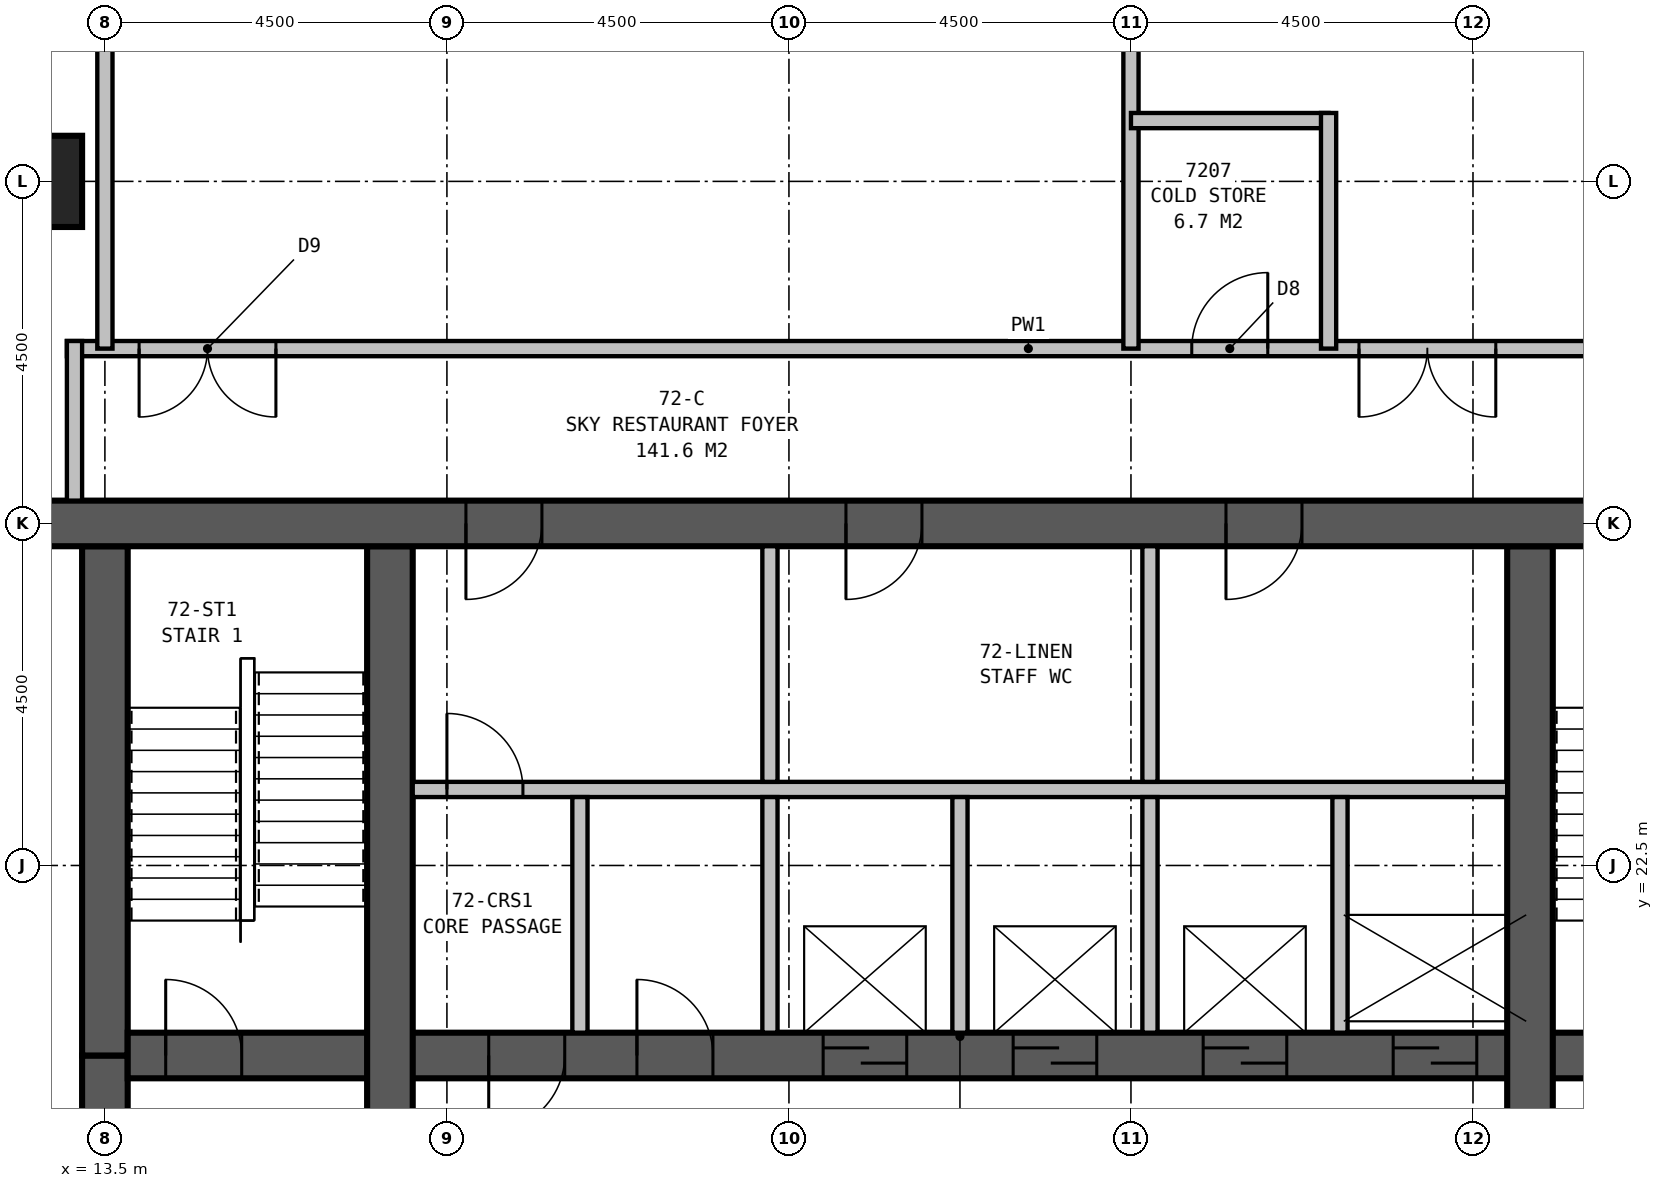
"""IFC4 building model, lengths in metres.
Left out: names, types, materials, properties, quantities, classifications, styles, units other than length and angle.
Written with IfcOpenShell. Run it as: python <this file> out.ifc"""

import sys

from ifc_helpers import new_model, si_unit, direction, frame, frame_2d, origin, origin_2d, place, context, subcontext, project, spatial, rectangle, extrude, element, fill, save


model = new_model("IFC4")
c1 = context("Model", 3, precision=1e-05, world=origin(), true_north=direction((0.0, 1.0)))
c2 = subcontext(c1, "Body", "Model", "MODEL_VIEW")
j1 = project(units=[si_unit("LENGTHUNIT", "METRE"), si_unit("PLANEANGLEUNIT", "RADIAN")], contexts=[c1])
p1 = place(None, origin())
s1 = spatial("IfcSite", under=j1, at=p1, CompositionType="ELEMENT")
p2 = place(p1, origin())
s2 = spatial("IfcBuilding", under=s1, at=p2, CompositionType="ELEMENT")
p3 = place(p2, frame((0.0, 0.0, 281.9)))
s3 = spatial("IfcBuildingStorey", under=s2, at=p3, CompositionType="ELEMENT", Elevation=281.9)
p4 = place(p3, frame((12.5, 31.5, 0.0), z_axis=(0.0, 0.0, 1.0), x_axis=(1.0, 0.0, 0.0)))
e1 = element("IfcColumn", 1, at=p4, inside=s3, PredefinedType="COLUMN", context=c2, shape_type="SweptSolid", body=[
    extrude(rectangle(XDim=1.4, YDim=1.2, at=origin_2d()), origin(), (0.0, 0.0, 1.0), 3.9),
])
p5 = place(p3, frame((36.3, 27.0, 0.0), z_axis=(0.0, 0.0, 1.0), x_axis=(-1.0, 0.0, 0.0)))
e2 = element("IfcWall", 2, at=p5, inside=s3, PredefinedType="SHEAR", context=c2, shape_type="SweptSolid", body=[
    extrude(rectangle(XDim=23.6, YDim=0.6, at=frame_2d((11.8, 0.0))), origin(), (0.0, 0.0, 1.0), 3.9),
])
p6 = place(p5, frame((17.05, 0.0, 0.0)))
e3 = element("IfcOpeningElement", 3, at=p6, cuts=e2, PredefinedType="OPENING", context=c2, shape_type="SweptSolid", body=[
    extrude(rectangle(XDim=1.0, YDim=2.1, at=frame_2d((0.5, 1.05))), frame((0.0, 0.31, 0.0), z_axis=(0.0, -1.0, 0.0), x_axis=(1.0, 0.0, 0.0)), (0.0, 0.0, 1.0), 0.62),
])
p7 = place(p5, frame((12.05, 0.0, 0.0)))
e4 = element("IfcOpeningElement", 4, at=p7, cuts=e2, PredefinedType="OPENING", context=c2, shape_type="SweptSolid", body=[
    extrude(rectangle(XDim=1.0, YDim=2.1, at=frame_2d((0.5, 1.05))), frame((0.0, 0.31, 0.0), z_axis=(0.0, -1.0, 0.0), x_axis=(1.0, 0.0, 0.0)), (0.0, 0.0, 1.0), 0.62),
])
p8 = place(p5, frame((7.05, 0.0, 0.0)))
e5 = element("IfcOpeningElement", 5, at=p8, cuts=e2, PredefinedType="OPENING", context=c2, shape_type="SweptSolid", body=[
    extrude(rectangle(XDim=1.0, YDim=2.1, at=frame_2d((0.5, 1.05))), frame((0.0, 0.31, 0.0), z_axis=(0.0, -1.0, 0.0), x_axis=(1.0, 0.0, 0.0)), (0.0, 0.0, 1.0), 0.62),
])
p9 = place(p3, frame((17.25, 13.8, 0.0), z_axis=(0.0, 0.0, 1.0), x_axis=(0.0, 1.0, 0.0)))
e6 = element("IfcWall", 6, at=p9, inside=s3, PredefinedType="SHEAR", context=c2, shape_type="SweptSolid", body=[
    extrude(rectangle(XDim=12.9, YDim=0.6, at=frame_2d((6.45, 0.0))), origin(), (0.0, 0.0, 1.0), 3.9),
])
p10 = place(p9, frame((3.85, 0.0, 0.0)))
e7 = element("IfcOpeningElement", 7, at=p10, cuts=e6, PredefinedType="OPENING", context=c2, shape_type="SweptSolid", body=[
    extrude(rectangle(XDim=1.2, YDim=2.1, at=frame_2d((0.6, 1.05))), frame((0.0, 0.31, 0.0), z_axis=(0.0, -1.0, 0.0), x_axis=(1.0, 0.0, 0.0)), (0.0, 0.0, 1.0), 0.62),
])
p11 = place(p3, frame((32.25, 13.8, 0.0), z_axis=(0.0, 0.0, 1.0), x_axis=(0.0, 1.0, 0.0)))
e8 = element("IfcWall", 8, at=p11, inside=s3, PredefinedType="SHEAR", context=c2, shape_type="SweptSolid", body=[
    extrude(rectangle(XDim=12.9, YDim=0.6, at=frame_2d((6.45, 0.0))), origin(), (0.0, 0.0, 1.0), 3.9),
])
p12 = place(p11, frame((5.05, 0.0, 0.0), z_axis=(0.0, 0.0, 1.0), x_axis=(-1.0, 0.0, 0.0)))
e9 = element("IfcOpeningElement", 9, at=p12, cuts=e8, PredefinedType="OPENING", context=c2, shape_type="SweptSolid", body=[
    extrude(rectangle(XDim=1.2, YDim=2.1, at=frame_2d((0.6, 1.05))), frame((0.0, 0.31, 0.0), z_axis=(0.0, -1.0, 0.0), x_axis=(1.0, 0.0, 0.0)), (0.0, 0.0, 1.0), 0.62),
])
p13 = place(p3, frame((13.8, 20.0, 0.0), z_axis=(0.0, 0.0, 1.0), x_axis=(1.0, 0.0, 0.0)))
e10 = element("IfcWall", 10, at=p13, inside=s3, PredefinedType="SHEAR", context=c2, shape_type="SweptSolid", body=[
    extrude(rectangle(XDim=21.9, YDim=0.6, at=frame_2d((10.95, 0.0))), origin(), (0.0, 0.0, 1.0), 3.9),
])
p14 = place(p13, frame((0.5, 0.0, 0.0)))
e11 = element("IfcOpeningElement", 11, at=p14, cuts=e10, PredefinedType="OPENING", context=c2, shape_type="SweptSolid", body=[
    extrude(rectangle(XDim=1.0, YDim=2.1, at=frame_2d((0.5, 1.05))), frame((0.0, 0.31, 0.0), z_axis=(0.0, -1.0, 0.0), x_axis=(1.0, 0.0, 0.0)), (0.0, 0.0, 1.0), 0.62),
])
p15 = place(p13, frame((20.5, 0.0, 0.0)))
e12 = element("IfcOpeningElement", 12, at=p15, cuts=e10, PredefinedType="OPENING", context=c2, shape_type="SweptSolid", body=[
    extrude(rectangle(XDim=1.0, YDim=2.1, at=frame_2d((0.5, 1.05))), frame((0.0, 0.31, 0.0), z_axis=(0.0, -1.0, 0.0), x_axis=(1.0, 0.0, 0.0)), (0.0, 0.0, 1.0), 0.62),
])
p16 = place(p13, frame((9.15, 0.0, 0.0)))
e13 = element("IfcOpeningElement", 13, at=p16, cuts=e10, PredefinedType="OPENING", context=c2, shape_type="SweptSolid", body=[
    extrude(rectangle(XDim=1.1, YDim=2.1, at=frame_2d((0.55, 1.05))), frame((0.0, 0.31, 0.0), z_axis=(0.0, -1.0, 0.0), x_axis=(1.0, 0.0, 0.0)), (0.0, 0.0, 1.0), 0.62),
])
p17 = place(p13, frame((11.65, 0.0, 0.0)))
e14 = element("IfcOpeningElement", 14, at=p17, cuts=e10, PredefinedType="OPENING", context=c2, shape_type="SweptSolid", body=[
    extrude(rectangle(XDim=1.1, YDim=2.1, at=frame_2d((0.55, 1.05))), frame((0.0, 0.31, 0.0), z_axis=(0.0, -1.0, 0.0), x_axis=(1.0, 0.0, 0.0)), (0.0, 0.0, 1.0), 0.62),
])
p18 = place(p13, frame((14.15, 0.0, 0.0)))
e15 = element("IfcOpeningElement", 15, at=p18, cuts=e10, PredefinedType="OPENING", context=c2, shape_type="SweptSolid", body=[
    extrude(rectangle(XDim=1.1, YDim=2.1, at=frame_2d((0.55, 1.05))), frame((0.0, 0.31, 0.0), z_axis=(0.0, -1.0, 0.0), x_axis=(1.0, 0.0, 0.0)), (0.0, 0.0, 1.0), 0.62),
])
p19 = place(p13, frame((16.65, 0.0, 0.0)))
e16 = element("IfcOpeningElement", 16, at=p19, cuts=e10, PredefinedType="OPENING", context=c2, shape_type="SweptSolid", body=[
    extrude(rectangle(XDim=1.1, YDim=2.1, at=frame_2d((0.55, 1.05))), frame((0.0, 0.31, 0.0), z_axis=(0.0, -1.0, 0.0), x_axis=(1.0, 0.0, 0.0)), (0.0, 0.0, 1.0), 0.62),
])
p20 = place(p13, frame((5.75, 0.0, 0.0), z_axis=(0.0, 0.0, 1.0), x_axis=(-1.0, 0.0, 0.0)))
e17 = element("IfcOpeningElement", 17, at=p20, cuts=e10, PredefinedType="OPENING", context=c2, shape_type="SweptSolid", body=[
    extrude(rectangle(XDim=1.0, YDim=2.1, at=frame_2d((0.5, 1.05))), frame((0.0, 0.31, 0.0), z_axis=(0.0, -1.0, 0.0), x_axis=(1.0, 0.0, 0.0)), (0.0, 0.0, 1.0), 0.62),
])
p21 = place(p13, frame((6.7, 0.0, 0.0)))
e18 = element("IfcOpeningElement", 18, at=p21, cuts=e10, PredefinedType="OPENING", context=c2, shape_type="SweptSolid", body=[
    extrude(rectangle(XDim=1.0, YDim=2.1, at=frame_2d((0.5, 1.05))), frame((0.0, 0.31, 0.0), z_axis=(0.0, -1.0, 0.0), x_axis=(1.0, 0.0, 0.0)), (0.0, 0.0, 1.0), 0.62),
])
p22 = place(p3, frame((13.5, 26.7, 0.0), z_axis=(0.0, 0.0, 1.0), x_axis=(0.0, -1.0, 0.0)))
e19 = element("IfcWall", 19, at=p22, inside=s3, PredefinedType="SHEAR", context=c2, shape_type="SweptSolid", body=[
    extrude(rectangle(XDim=6.7, YDim=0.6, at=frame_2d((3.35, 0.0))), origin(), (0.0, 0.0, 1.0), 3.9),
])
p23 = place(p3, frame((13.5, 20.0, 0.0), z_axis=(0.0, 0.0, 1.0), x_axis=(0.0, -1.0, 0.0)))
e20 = element("IfcWall", 20, at=p23, inside=s3, PredefinedType="SHEAR", context=c2, shape_type="SweptSolid", body=[
    extrude(rectangle(XDim=3.5, YDim=0.6, at=frame_2d((1.75, 0.0))), origin(), (0.0, 0.0, 1.0), 3.9),
])
p24 = place(p23, frame((1.65, 0.0, 0.0)))
e21 = element("IfcOpeningElement", 21, at=p24, cuts=e20, PredefinedType="OPENING", context=c2, shape_type="SweptSolid", body=[
    extrude(rectangle(XDim=1.2, YDim=2.1, at=frame_2d((0.6, 1.05))), frame((0.0, 0.31, 0.0), z_axis=(0.0, -1.0, 0.0), x_axis=(1.0, 0.0, 0.0)), (0.0, 0.0, 1.0), 0.62),
])
p25 = place(p3, frame((13.0, 29.3, 0.0), z_axis=(0.0, 0.0, 1.0), x_axis=(1.0, 0.0, 0.0)))
e22 = element("IfcWall", 22, at=p25, inside=s3, PredefinedType="PARTITIONING", context=c2, shape_type="SweptSolid", body=[
    extrude(rectangle(XDim=25.3, YDim=0.2, at=frame_2d((12.65, 0.0))), origin(), (0.0, 0.0, 1.0), 3.65),
])
p26 = place(p25, frame((2.75, 0.0, 0.0), z_axis=(0.0, 0.0, 1.0), x_axis=(-1.0, 0.0, 0.0)))
e23 = element("IfcOpeningElement", 23, at=p26, cuts=e22, PredefinedType="OPENING", context=c2, shape_type="SweptSolid", body=[
    extrude(rectangle(XDim=1.8, YDim=2.4, at=frame_2d((0.9, 1.2))), frame((0.0, 0.11, 0.0), z_axis=(0.0, -1.0, 0.0), x_axis=(1.0, 0.0, 0.0)), (0.0, 0.0, 1.0), 0.22),
])
p27 = place(p25, frame((14.8, 0.0, 0.0)))
e24 = element("IfcOpeningElement", 24, at=p27, cuts=e22, PredefinedType="OPENING", context=c2, shape_type="SweptSolid", body=[
    extrude(rectangle(XDim=1.0, YDim=2.1, at=frame_2d((0.5, 1.05))), frame((0.0, 0.11, 0.0), z_axis=(0.0, -1.0, 0.0), x_axis=(1.0, 0.0, 0.0)), (0.0, 0.0, 1.0), 0.22),
])
p28 = place(p25, frame((18.8, 0.0, 0.0), z_axis=(0.0, 0.0, 1.0), x_axis=(-1.0, 0.0, 0.0)))
e25 = element("IfcOpeningElement", 25, at=p28, cuts=e22, PredefinedType="OPENING", context=c2, shape_type="SweptSolid", body=[
    extrude(rectangle(XDim=1.8, YDim=2.4, at=frame_2d((0.9, 1.2))), frame((0.0, 0.11, 0.0), z_axis=(0.0, -1.0, 0.0), x_axis=(1.0, 0.0, 0.0)), (0.0, 0.0, 1.0), 0.22),
])
p29 = place(p25, frame((23.55, 0.0, 0.0)))
e26 = element("IfcOpeningElement", 26, at=p29, cuts=e22, PredefinedType="OPENING", context=c2, shape_type="SweptSolid", body=[
    extrude(rectangle(XDim=1.2, YDim=2.1, at=frame_2d((0.6, 1.05))), frame((0.0, 0.11, 0.0), z_axis=(0.0, -1.0, 0.0), x_axis=(1.0, 0.0, 0.0)), (0.0, 0.0, 1.0), 0.22),
])
p30 = place(p3, frame((13.5, 29.3, 0.0), z_axis=(0.0, 0.0, 1.0), x_axis=(0.0, 1.0, 0.0)))
e27 = element("IfcWall", 27, at=p30, inside=s3, PredefinedType="PARTITIONING", context=c2, shape_type="SweptSolid", body=[
    extrude(rectangle(XDim=6.082, YDim=0.2, at=frame_2d((3.041, 0.0))), origin(), (0.0, 0.0, 1.0), 2.65),
])
p31 = place(p3, frame((27.0, 29.3, 0.0), z_axis=(0.0, 0.0, 1.0), x_axis=(0.0, 1.0, 0.0)))
e28 = element("IfcWall", 28, at=p31, inside=s3, PredefinedType="PARTITIONING", context=c2, shape_type="SweptSolid", body=[
    extrude(rectangle(XDim=10.59, YDim=0.2, at=frame_2d((5.295, 0.0))), origin(), (0.0, 0.0, 1.0), 2.65),
])
p32 = place(p3, frame((29.6, 29.3, 0.0), z_axis=(0.0, 0.0, 1.0), x_axis=(0.0, 1.0, 0.0)))
e29 = element("IfcWall", 29, at=p32, inside=s3, PredefinedType="PARTITIONING", context=c2, shape_type="SweptSolid", body=[
    extrude(rectangle(XDim=3.1, YDim=0.2, at=frame_2d((1.55, 0.0))), origin(), (0.0, 0.0, 1.0), 3.65),
])
p33 = place(p3, frame((27.0, 32.3, 0.0), z_axis=(0.0, 0.0, 1.0), x_axis=(1.0, 0.0, 0.0)))
e30 = element("IfcWall", 30, at=p33, inside=s3, PredefinedType="PARTITIONING", context=c2, shape_type="SweptSolid", body=[
    extrude(rectangle(XDim=2.6, YDim=0.2, at=frame_2d((1.3, 0.0))), origin(), (0.0, 0.0, 1.0), 3.65),
])
p34 = place(p3, frame((13.1, 27.3, 0.0), z_axis=(0.0, 0.0, 1.0), x_axis=(0.0, 1.0, 0.0)))
e31 = element("IfcWall", 31, at=p34, inside=s3, PredefinedType="PARTITIONING", context=c2, shape_type="SweptSolid", body=[
    extrude(rectangle(XDim=2.1, YDim=0.2, at=frame_2d((1.05, 0.0))), origin(), (0.0, 0.0, 1.0), 3.65),
])
for number, where, z_axis, x_axis in (
    (32, (19.75, 20.3, 0.0), (0.0, 0.0, 1.0), (0.0, 1.0, 0.0)),
    (33, (22.25, 20.3, 0.0), (0.0, 0.0, 1.0), (0.0, 1.0, 0.0)),
    (34, (24.75, 20.3, 0.0), (0.0, 0.0, 1.0), (0.0, 1.0, 0.0)),
    (35, (27.25, 20.3, 0.0), (0.0, 0.0, 1.0), (0.0, 1.0, 0.0)),
    (36, (29.75, 20.3, 0.0), (0.0, 0.0, 1.0), (0.0, 1.0, 0.0)),
):
    element("IfcWall", number, at=place(p3, frame(where, z_axis=z_axis, x_axis=x_axis)), inside=s3, PredefinedType="PARTITIONING", context=c2, shape_type="SweptSolid", body=[
        extrude(rectangle(XDim=3.1, YDim=0.2, at=frame_2d((1.55, 0.0))), origin(), (0.0, 0.0, 1.0), 3.65),
    ])
p35 = place(p3, frame((17.55, 23.5, 0.0), z_axis=(0.0, 0.0, 1.0), x_axis=(1.0, 0.0, 0.0)))
e37 = element("IfcWall", 37, at=p35, inside=s3, PredefinedType="PARTITIONING", context=c2, shape_type="SweptSolid", body=[
    extrude(rectangle(XDim=14.4, YDim=0.2, at=frame_2d((7.2, 0.0))), origin(), (0.0, 0.0, 1.0), 3.65),
])
p36 = place(p35, frame((0.45, 0.0, 0.0)))
e38 = element("IfcOpeningElement", 38, at=p36, cuts=e37, PredefinedType="OPENING", context=c2, shape_type="SweptSolid", body=[
    extrude(rectangle(XDim=1.0, YDim=2.1, at=frame_2d((0.5, 1.05))), frame((0.0, 0.11, 0.0), z_axis=(0.0, -1.0, 0.0), x_axis=(1.0, 0.0, 0.0)), (0.0, 0.0, 1.0), 0.22),
])
for number, where, z_axis, x_axis in (
    (39, (22.25, 23.6, 0.0), (0.0, 0.0, 1.0), (0.0, 1.0, 0.0)),
    (40, (27.25, 23.6, 0.0), (0.0, 0.0, 1.0), (0.0, 1.0, 0.0)),
):
    element("IfcWall", number, at=place(p3, frame(where, z_axis=z_axis, x_axis=x_axis)), inside=s3, PredefinedType="PARTITIONING", context=c2, shape_type="SweptSolid", body=[
        extrude(rectangle(XDim=3.1, YDim=0.2, at=frame_2d((1.55, 0.0))), origin(), (0.0, 0.0, 1.0), 3.65),
    ])
p37 = place(p26, origin())
e41 = element("IfcDoor", 41, at=p37, inside=s3, OperationType="DOUBLE_DOOR_SINGLE_SWING", PredefinedType="DOOR", context=c2, shape_type="SweptSolid", body=[
    extrude(rectangle(XDim=1.8, YDim=2.4, at=frame_2d((0.9, 1.2))), frame((0.0, 0.025, 0.0), z_axis=(0.0, -1.0, 0.0), x_axis=(1.0, 0.0, 0.0)), (0.0, 0.0, 1.0), 0.05),
])
fill(e23, e41)
p38 = place(p27, origin())
e42 = element("IfcDoor", 42, at=p38, inside=s3, OperationType="SINGLE_SWING_RIGHT", PredefinedType="DOOR", context=c2, shape_type="SweptSolid", body=[
    extrude(rectangle(XDim=1.0, YDim=2.1, at=frame_2d((0.5, 1.05))), frame((0.0, 0.025, 0.0), z_axis=(0.0, -1.0, 0.0), x_axis=(1.0, 0.0, 0.0)), (0.0, 0.0, 1.0), 0.05),
])
fill(e24, e42)
p39 = place(p28, origin())
e43 = element("IfcDoor", 43, at=p39, inside=s3, OperationType="DOUBLE_DOOR_SINGLE_SWING", PredefinedType="DOOR", context=c2, shape_type="SweptSolid", body=[
    extrude(rectangle(XDim=1.8, YDim=2.4, at=frame_2d((0.9, 1.2))), frame((0.0, 0.025, 0.0), z_axis=(0.0, -1.0, 0.0), x_axis=(1.0, 0.0, 0.0)), (0.0, 0.0, 1.0), 0.05),
])
fill(e25, e43)
p40 = place(p36, origin())
e44 = element("IfcDoor", 44, at=p40, inside=s3, OperationType="SINGLE_SWING_LEFT", PredefinedType="DOOR", context=c2, shape_type="SweptSolid", body=[
    extrude(rectangle(XDim=1.0, YDim=2.1, at=frame_2d((0.5, 1.05))), frame((0.0, 0.025, 0.0), z_axis=(0.0, -1.0, 0.0), x_axis=(1.0, 0.0, 0.0)), (0.0, 0.0, 1.0), 0.05),
])
fill(e38, e44)
p41 = place(p14, origin())
e45 = element("IfcDoor", 45, at=p41, inside=s3, OperationType="SINGLE_SWING_LEFT", PredefinedType="DOOR", context=c2, shape_type="SweptSolid", body=[
    extrude(rectangle(XDim=1.0, YDim=2.1, at=frame_2d((0.5, 1.05))), frame((0.0, 0.3, 0.0), z_axis=(0.0, -1.0, 0.0), x_axis=(1.0, 0.0, 0.0)), (0.0, 0.0, 1.0), 0.6),
])
fill(e11, e45)
p42 = place(p16, origin())
e46 = element("IfcDoor", 46, at=p42, inside=s3, OperationType="SLIDING_TO_LEFT", PredefinedType="DOOR", context=c2, shape_type="SweptSolid", body=[
    extrude(rectangle(XDim=1.1, YDim=2.1, at=frame_2d((0.55, 1.05))), frame((0.0, 0.3, 0.0), z_axis=(0.0, -1.0, 0.0), x_axis=(1.0, 0.0, 0.0)), (0.0, 0.0, 1.0), 0.6),
])
fill(e13, e46)
p43 = place(p17, origin())
e47 = element("IfcDoor", 47, at=p43, inside=s3, OperationType="SLIDING_TO_LEFT", PredefinedType="DOOR", context=c2, shape_type="SweptSolid", body=[
    extrude(rectangle(XDim=1.1, YDim=2.1, at=frame_2d((0.55, 1.05))), frame((0.0, 0.3, 0.0), z_axis=(0.0, -1.0, 0.0), x_axis=(1.0, 0.0, 0.0)), (0.0, 0.0, 1.0), 0.6),
])
fill(e14, e47)
p44 = place(p18, origin())
e48 = element("IfcDoor", 48, at=p44, inside=s3, OperationType="SLIDING_TO_LEFT", PredefinedType="DOOR", context=c2, shape_type="SweptSolid", body=[
    extrude(rectangle(XDim=1.1, YDim=2.1, at=frame_2d((0.55, 1.05))), frame((0.0, 0.3, 0.0), z_axis=(0.0, -1.0, 0.0), x_axis=(1.0, 0.0, 0.0)), (0.0, 0.0, 1.0), 0.6),
])
fill(e15, e48)
p45 = place(p19, origin())
e49 = element("IfcDoor", 49, at=p45, inside=s3, OperationType="SLIDING_TO_LEFT", PredefinedType="DOOR", context=c2, shape_type="SweptSolid", body=[
    extrude(rectangle(XDim=1.1, YDim=2.1, at=frame_2d((0.55, 1.05))), frame((0.0, 0.3, 0.0), z_axis=(0.0, -1.0, 0.0), x_axis=(1.0, 0.0, 0.0)), (0.0, 0.0, 1.0), 0.6),
])
fill(e16, e49)
p46 = place(p20, origin())
e50 = element("IfcDoor", 50, at=p46, inside=s3, OperationType="SINGLE_SWING_RIGHT", PredefinedType="DOOR", context=c2, shape_type="SweptSolid", body=[
    extrude(rectangle(XDim=1.0, YDim=2.1, at=frame_2d((0.5, 1.05))), frame((0.0, 0.3, 0.0), z_axis=(0.0, -1.0, 0.0), x_axis=(1.0, 0.0, 0.0)), (0.0, 0.0, 1.0), 0.6),
])
fill(e17, e50)
p47 = place(p21, origin())
e51 = element("IfcDoor", 51, at=p47, inside=s3, OperationType="SINGLE_SWING_LEFT", PredefinedType="DOOR", context=c2, shape_type="SweptSolid", body=[
    extrude(rectangle(XDim=1.0, YDim=2.1, at=frame_2d((0.5, 1.05))), frame((0.0, 0.3, 0.0), z_axis=(0.0, -1.0, 0.0), x_axis=(1.0, 0.0, 0.0)), (0.0, 0.0, 1.0), 0.6),
])
fill(e18, e51)
p48 = place(p6, origin())
e52 = element("IfcDoor", 52, at=p48, inside=s3, OperationType="SINGLE_SWING_RIGHT", PredefinedType="DOOR", context=c2, shape_type="SweptSolid", body=[
    extrude(rectangle(XDim=1.0, YDim=2.1, at=frame_2d((0.5, 1.05))), frame((0.0, 0.3, 0.0), z_axis=(0.0, -1.0, 0.0), x_axis=(1.0, 0.0, 0.0)), (0.0, 0.0, 1.0), 0.6),
])
fill(e3, e52)
p49 = place(p7, origin())
e53 = element("IfcDoor", 53, at=p49, inside=s3, OperationType="SINGLE_SWING_RIGHT", PredefinedType="DOOR", context=c2, shape_type="SweptSolid", body=[
    extrude(rectangle(XDim=1.0, YDim=2.1, at=frame_2d((0.5, 1.05))), frame((0.0, 0.3, 0.0), z_axis=(0.0, -1.0, 0.0), x_axis=(1.0, 0.0, 0.0)), (0.0, 0.0, 1.0), 0.6),
])
fill(e4, e53)
p50 = place(p8, origin())
e54 = element("IfcDoor", 54, at=p50, inside=s3, OperationType="SINGLE_SWING_RIGHT", PredefinedType="DOOR", context=c2, shape_type="SweptSolid", body=[
    extrude(rectangle(XDim=1.0, YDim=2.1, at=frame_2d((0.5, 1.05))), frame((0.0, 0.3, 0.0), z_axis=(0.0, -1.0, 0.0), x_axis=(1.0, 0.0, 0.0)), (0.0, 0.0, 1.0), 0.6),
])
fill(e5, e54)
save(model, sys.argv[1])
